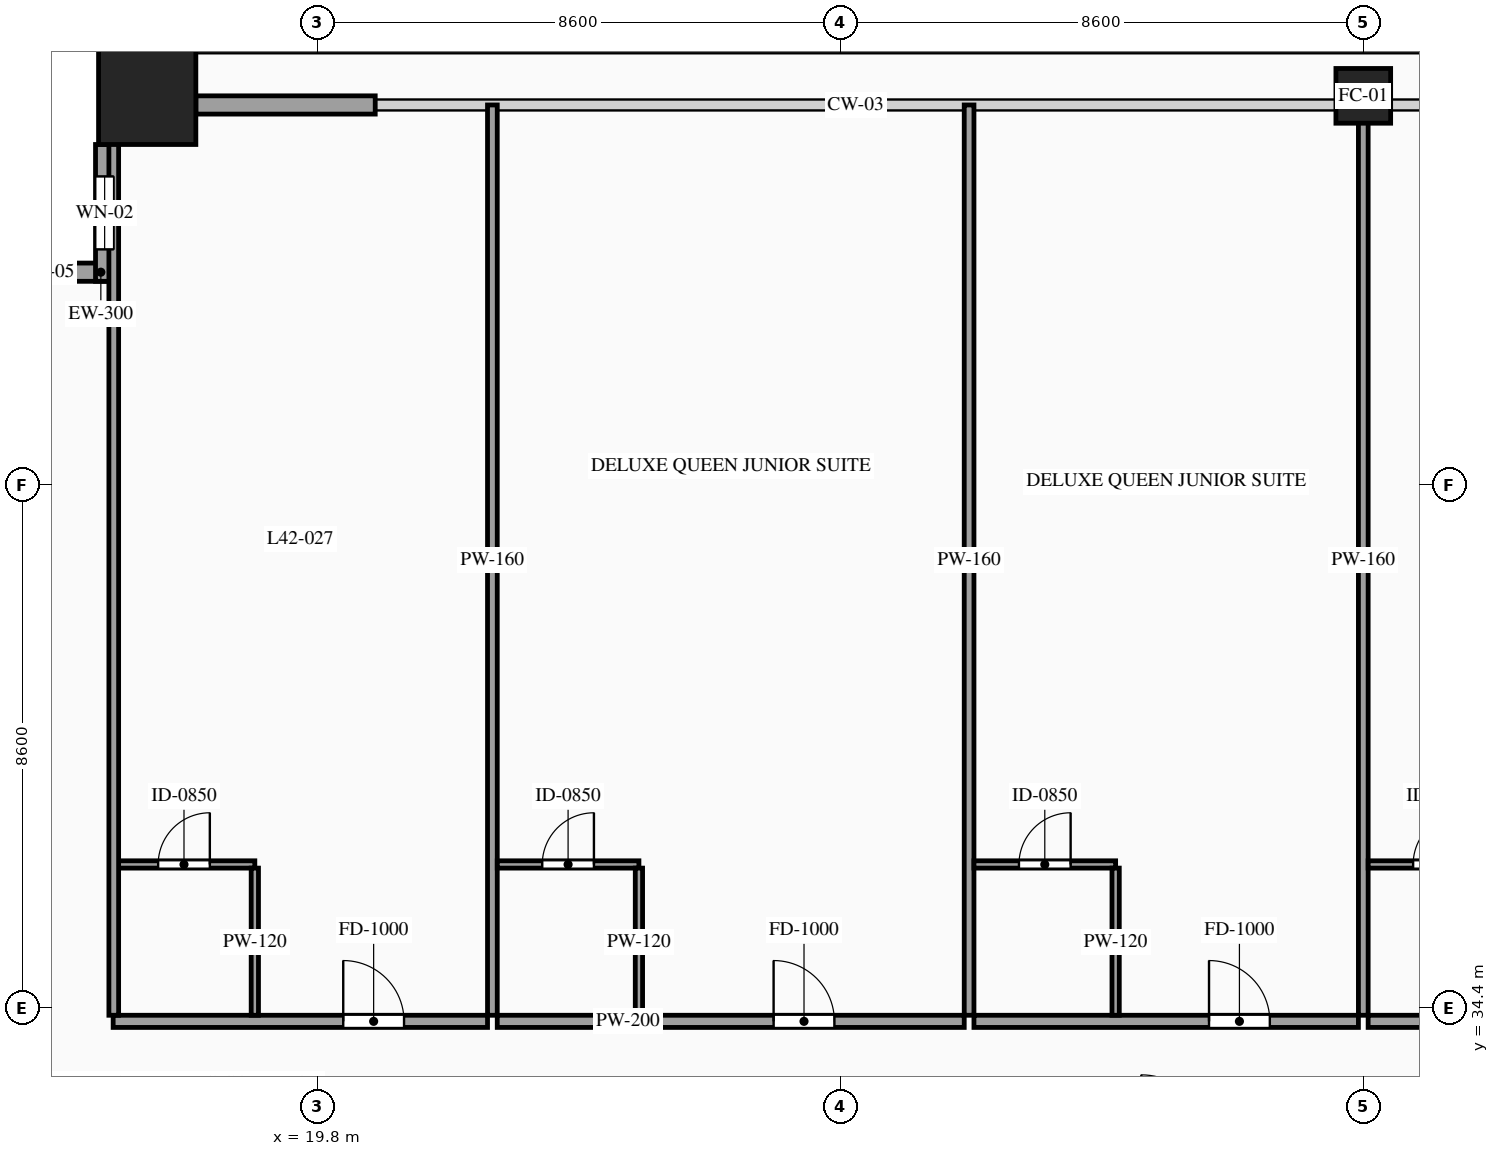
"""IFC4 building model, lengths in metres.
Left out: names, types, materials, properties, quantities, classifications, styles, units other than length and angle.
Written with IfcOpenShell. Run it as: python <this file> out.ifc"""

import sys

from ifc_helpers import new_model, si_unit, direction, frame, frame_2d, origin, origin_2d, place, context, subcontext, project, spatial, rectangle, hollow_rectangle, extrude, source, transform, mapped, element, fill, save


model = new_model("IFC4")
c1 = context("Model", 3, precision=1e-05, world=origin(), true_north=direction((0.0, 1.0)))
c2 = subcontext(c1, "Body", "Model", "MODEL_VIEW")
j1 = project(units=[si_unit("LENGTHUNIT", "METRE"), si_unit("PLANEANGLEUNIT", "RADIAN")], contexts=[c1])
p1 = place(None, origin())
s1 = spatial("IfcSite", under=j1, at=p1, CompositionType="ELEMENT")
p2 = place(p1, origin())
s2 = spatial("IfcBuilding", under=s1, at=p2, CompositionType="ELEMENT")
p3 = place(p2, frame((0.0, 0.0, 159.6)))
s3 = spatial("IfcBuildingStorey", under=s2, at=p3, CompositionType="ELEMENT", Elevation=159.6)
m1 = source(origin(), c2, "Body", "SweptSolid", [
    extrude(hollow_rectangle(XDim=1.6, YDim=1.6, WallThickness=0.07, at=origin_2d()), origin(), (0.0, 0.0, 1.0), 3.6),
])
p4 = place(p3, frame((17.0, 49.4, 0.0), z_axis=(0.0, 0.0, 1.0), x_axis=(1.0, 0.0, 0.0)))
e1 = element("IfcColumn", 1, at=p4, inside=s3, PredefinedType="COLUMN", context=c2, shape_type="MappedRepresentation", body=[
    mapped(m1, transform((0.0, 0.0, 0.0), scale=1.0)),
])
m2 = source(origin(), c2, "Body", "SweptSolid", [
    extrude(hollow_rectangle(XDim=0.9, YDim=0.9, WallThickness=0.042, at=origin_2d()), origin(), (0.0, 0.0, 1.0), 3.6),
])
p5 = place(p3, frame((37.0, 49.4, 0.0), z_axis=(0.0, 0.0, 1.0), x_axis=(1.0, 0.0, 0.0)))
e2 = element("IfcColumn", 2, at=p5, inside=s3, PredefinedType="COLUMN", context=c2, shape_type="MappedRepresentation", body=[
    mapped(m2, transform((0.0, 0.0, 0.0), scale=1.0)),
])
p6 = place(p3, frame((16.45, 46.5, 0.0), z_axis=(0.0, 0.0, 1.0), x_axis=(-1.0, 0.0, 0.0)))
e3 = element("IfcWall", 3, at=p6, inside=s3, PredefinedType="SOLIDWALL", context=c2, shape_type="SweptSolid", body=[
    extrude(rectangle(XDim=2.25, YDim=0.3, at=frame_2d((1.125, 0.0))), origin(), (0.0, 0.0, 1.0), 3.38),
])
p7 = place(p6, frame((0.675, 0.0, 0.85)))
e4 = element("IfcOpeningElement", 4, at=p7, cuts=e3, PredefinedType="OPENING", context=c2, shape_type="SweptSolid", body=[
    extrude(rectangle(XDim=0.9, YDim=1.5, at=frame_2d((0.45, 0.75))), frame((0.0, 0.165, 0.0), z_axis=(0.0, -1.0, 0.0), x_axis=(1.0, 0.0, 0.0)), (0.0, 0.0, 1.0), 0.33),
])
p8 = place(p3, frame((16.3, 48.6, 0.0), z_axis=(0.0, 0.0, 1.0), x_axis=(0.0, -1.0, 0.0)))
e5 = element("IfcWall", 5, at=p8, inside=s3, PredefinedType="SOLIDWALL", context=c2, shape_type="SweptSolid", body=[
    extrude(rectangle(XDim=2.25, YDim=0.3, at=frame_2d((1.125, 0.0))), origin(), (0.0, 0.0, 1.0), 3.38),
])
p9 = place(p8, frame((0.525, 0.0, 0.85)))
e6 = element("IfcOpeningElement", 6, at=p9, cuts=e5, PredefinedType="OPENING", context=c2, shape_type="SweptSolid", body=[
    extrude(rectangle(XDim=1.2, YDim=2.1, at=frame_2d((0.6, 1.05))), frame((0.0, 0.165, 0.0), z_axis=(0.0, -1.0, 0.0), x_axis=(1.0, 0.0, 0.0)), (0.0, 0.0, 1.0), 0.33),
])
m3 = source(origin(), c2, "Body", "SweptSolid", [
    extrude(rectangle(XDim=2.95, YDim=0.3, at=frame_2d((1.475, 0.0))), origin(), (0.0, 0.0, 1.0), 2.775),
])
p10 = place(p3, frame((17.8, 49.25, 0.0), z_axis=(0.0, 0.0, 1.0), x_axis=(1.0, 0.0, 0.0)))
e7 = element("IfcWall", 7, at=p10, inside=s3, PredefinedType="SOLIDWALL", context=c2, shape_type="MappedRepresentation", body=[
    mapped(m3, transform((0.0, 0.0, 0.0), scale=1.0)),
])
p11 = place(p3, frame((16.44, 34.18, 0.0), z_axis=(0.0, 0.0, 1.0), x_axis=(1.0, 0.0, 0.0)))
e8 = element("IfcWall", 8, at=p11, inside=s3, PredefinedType="PARTITIONING", context=c2, shape_type="SweptSolid", body=[
    extrude(rectangle(XDim=6.157, YDim=0.2, at=frame_2d((3.079, 0.0))), origin(), (0.0, 0.0, 1.0), 3.38),
])
p12 = place(p11, frame((3.784, 0.0, 0.0)))
e9 = element("IfcOpeningElement", 9, at=p12, cuts=e8, PredefinedType="OPENING", context=c2, shape_type="SweptSolid", body=[
    extrude(rectangle(XDim=1.0, YDim=2.2, at=frame_2d((0.5, 1.1))), frame((0.0, 0.115, 0.0), z_axis=(0.0, -1.0, 0.0), x_axis=(1.0, 0.0, 0.0)), (0.0, 0.0, 1.0), 0.23),
])
m4 = source(origin(), c2, "Body", "SweptSolid", [
    extrude(rectangle(XDim=14.97, YDim=0.16, at=frame_2d((7.485, 0.0))), origin(), (0.0, 0.0, 1.0), 3.38),
])
p13 = place(p3, frame((22.677, 34.28, 0.0), z_axis=(0.0, 0.0, 1.0), x_axis=(0.0, 1.0, 0.0)))
e10 = element("IfcWall", 10, at=p13, inside=s3, PredefinedType="PARTITIONING", context=c2, shape_type="MappedRepresentation", body=[
    mapped(m4, transform((0.0, 0.0, 0.0), scale=1.0)),
])
p14 = place(p3, frame((16.44, 36.76, 0.0), z_axis=(0.0, 0.0, 1.0), x_axis=(1.0, 0.0, 0.0)))
e11 = element("IfcWall", 11, at=p14, inside=s3, PredefinedType="PARTITIONING", context=c2, shape_type="SweptSolid", body=[
    extrude(rectangle(XDim=2.33, YDim=0.12, at=frame_2d((1.165, 0.0))), origin(), (0.0, 0.0, 1.0), 3.38),
])
p15 = place(p14, frame((0.74, 0.0, 0.0)))
e12 = element("IfcOpeningElement", 12, at=p15, cuts=e11, PredefinedType="OPENING", context=c2, shape_type="SweptSolid", body=[
    extrude(rectangle(XDim=0.85, YDim=2.1, at=frame_2d((0.425, 1.05))), frame((0.0, 0.075, 0.0), z_axis=(0.0, -1.0, 0.0), x_axis=(1.0, 0.0, 0.0)), (0.0, 0.0, 1.0), 0.15),
])
m5 = source(origin(), c2, "Body", "SweptSolid", [
    extrude(rectangle(XDim=2.42, YDim=0.12, at=frame_2d((1.21, 0.0))), origin(), (0.0, 0.0, 1.0), 3.38),
])
p16 = place(p3, frame((18.77, 34.28, 0.0), z_axis=(0.0, 0.0, 1.0), x_axis=(0.0, 1.0, 0.0)))
e13 = element("IfcWall", 13, at=p16, inside=s3, PredefinedType="PARTITIONING", context=c2, shape_type="MappedRepresentation", body=[
    mapped(m5, transform((0.0, 0.0, 0.0), scale=1.0)),
])
p17 = place(p3, frame((22.757, 34.18, 0.0), z_axis=(0.0, 0.0, 1.0), x_axis=(1.0, 0.0, 0.0)))
e14 = element("IfcWall", 14, at=p17, inside=s3, PredefinedType="PARTITIONING", context=c2, shape_type="SweptSolid", body=[
    extrude(rectangle(XDim=7.68, YDim=0.2, at=frame_2d((3.84, 0.0))), origin(), (0.0, 0.0, 1.0), 3.38),
])
p18 = place(p17, frame((4.545, 0.0, 0.0)))
e15 = element("IfcOpeningElement", 15, at=p18, cuts=e14, PredefinedType="OPENING", context=c2, shape_type="SweptSolid", body=[
    extrude(rectangle(XDim=1.0, YDim=2.2, at=frame_2d((0.5, 1.1))), frame((0.0, 0.115, 0.0), z_axis=(0.0, -1.0, 0.0), x_axis=(1.0, 0.0, 0.0)), (0.0, 0.0, 1.0), 0.23),
])
p19 = place(p3, frame((30.517, 34.28, 0.0), z_axis=(0.0, 0.0, 1.0), x_axis=(0.0, 1.0, 0.0)))
e16 = element("IfcWall", 16, at=p19, inside=s3, PredefinedType="PARTITIONING", context=c2, shape_type="MappedRepresentation", body=[
    mapped(m4, transform((0.0, 0.0, 0.0), scale=1.0)),
])
p20 = place(p3, frame((22.757, 36.76, 0.0), z_axis=(0.0, 0.0, 1.0), x_axis=(1.0, 0.0, 0.0)))
e17 = element("IfcWall", 17, at=p20, inside=s3, PredefinedType="PARTITIONING", context=c2, shape_type="SweptSolid", body=[
    extrude(rectangle(XDim=2.33, YDim=0.12, at=frame_2d((1.165, 0.0))), origin(), (0.0, 0.0, 1.0), 3.38),
])
p21 = place(p20, frame((0.74, 0.0, 0.0)))
e18 = element("IfcOpeningElement", 18, at=p21, cuts=e17, PredefinedType="OPENING", context=c2, shape_type="SweptSolid", body=[
    extrude(rectangle(XDim=0.85, YDim=2.1, at=frame_2d((0.425, 1.05))), frame((0.0, 0.075, 0.0), z_axis=(0.0, -1.0, 0.0), x_axis=(1.0, 0.0, 0.0)), (0.0, 0.0, 1.0), 0.15),
])
p22 = place(p3, frame((25.087, 34.28, 0.0), z_axis=(0.0, 0.0, 1.0), x_axis=(0.0, 1.0, 0.0)))
e19 = element("IfcWall", 19, at=p22, inside=s3, PredefinedType="PARTITIONING", context=c2, shape_type="MappedRepresentation", body=[
    mapped(m5, transform((0.0, 0.0, 0.0), scale=1.0)),
])
p23 = place(p3, frame((30.597, 34.18, 0.0), z_axis=(0.0, 0.0, 1.0), x_axis=(1.0, 0.0, 0.0)))
e20 = element("IfcWall", 20, at=p23, inside=s3, PredefinedType="PARTITIONING", context=c2, shape_type="SweptSolid", body=[
    extrude(rectangle(XDim=6.323, YDim=0.2, at=frame_2d((3.162, 0.0))), origin(), (0.0, 0.0, 1.0), 3.38),
])
p24 = place(p23, frame((3.866, 0.0, 0.0)))
e21 = element("IfcOpeningElement", 21, at=p24, cuts=e20, PredefinedType="OPENING", context=c2, shape_type="SweptSolid", body=[
    extrude(rectangle(XDim=1.0, YDim=2.2, at=frame_2d((0.5, 1.1))), frame((0.0, 0.115, 0.0), z_axis=(0.0, -1.0, 0.0), x_axis=(1.0, 0.0, 0.0)), (0.0, 0.0, 1.0), 0.23),
])
m6 = source(origin(), c2, "Body", "SweptSolid", [
    extrude(rectangle(XDim=14.97, YDim=0.16, at=frame_2d((7.485, 0.0))), origin(), (0.0, 0.0, 1.0), 2.675),
])
p25 = place(p3, frame((37.0, 34.28, 0.0), z_axis=(0.0, 0.0, 1.0), x_axis=(0.0, 1.0, 0.0)))
e22 = element("IfcWall", 22, at=p25, inside=s3, PredefinedType="PARTITIONING", context=c2, shape_type="MappedRepresentation", body=[
    mapped(m6, transform((0.0, 0.0, 0.0), scale=1.0)),
])
p26 = place(p3, frame((30.597, 36.76, 0.0), z_axis=(0.0, 0.0, 1.0), x_axis=(1.0, 0.0, 0.0)))
e23 = element("IfcWall", 23, at=p26, inside=s3, PredefinedType="PARTITIONING", context=c2, shape_type="SweptSolid", body=[
    extrude(rectangle(XDim=2.33, YDim=0.12, at=frame_2d((1.165, 0.0))), origin(), (0.0, 0.0, 1.0), 3.38),
])
p27 = place(p26, frame((0.74, 0.0, 0.0)))
e24 = element("IfcOpeningElement", 24, at=p27, cuts=e23, PredefinedType="OPENING", context=c2, shape_type="SweptSolid", body=[
    extrude(rectangle(XDim=0.85, YDim=2.1, at=frame_2d((0.425, 1.05))), frame((0.0, 0.075, 0.0), z_axis=(0.0, -1.0, 0.0), x_axis=(1.0, 0.0, 0.0)), (0.0, 0.0, 1.0), 0.15),
])
p28 = place(p3, frame((32.927, 34.28, 0.0), z_axis=(0.0, 0.0, 1.0), x_axis=(0.0, 1.0, 0.0)))
e25 = element("IfcWall", 25, at=p28, inside=s3, PredefinedType="PARTITIONING", context=c2, shape_type="MappedRepresentation", body=[
    mapped(m5, transform((0.0, 0.0, 0.0), scale=1.0)),
])
p29 = place(p3, frame((37.08, 34.18, 0.0), z_axis=(0.0, 0.0, 1.0), x_axis=(1.0, 0.0, 0.0)))
e26 = element("IfcWall", 26, at=p29, inside=s3, PredefinedType="PARTITIONING", context=c2, shape_type="SweptSolid", body=[
    extrude(rectangle(XDim=7.063, YDim=0.2, at=frame_2d((3.531, 0.0))), origin(), (0.0, 0.0, 1.0), 3.38),
])
p30 = place(p29, frame((4.236, 0.0, 0.0)))
e27 = element("IfcOpeningElement", 27, at=p30, cuts=e26, PredefinedType="OPENING", context=c2, shape_type="SweptSolid", body=[
    extrude(rectangle(XDim=1.0, YDim=2.2, at=frame_2d((0.5, 1.1))), frame((0.0, 0.115, 0.0), z_axis=(0.0, -1.0, 0.0), x_axis=(1.0, 0.0, 0.0)), (0.0, 0.0, 1.0), 0.23),
])
p31 = place(p3, frame((37.08, 36.76, 0.0), z_axis=(0.0, 0.0, 1.0), x_axis=(1.0, 0.0, 0.0)))
e28 = element("IfcWall", 28, at=p31, inside=s3, PredefinedType="PARTITIONING", context=c2, shape_type="SweptSolid", body=[
    extrude(rectangle(XDim=2.33, YDim=0.12, at=frame_2d((1.165, 0.0))), origin(), (0.0, 0.0, 1.0), 3.38),
])
p32 = place(p31, frame((0.74, 0.0, 0.0)))
e29 = element("IfcOpeningElement", 29, at=p32, cuts=e28, PredefinedType="OPENING", context=c2, shape_type="SweptSolid", body=[
    extrude(rectangle(XDim=0.85, YDim=2.1, at=frame_2d((0.425, 1.05))), frame((0.0, 0.075, 0.0), z_axis=(0.0, -1.0, 0.0), x_axis=(1.0, 0.0, 0.0)), (0.0, 0.0, 1.0), 0.15),
])
m7 = source(origin(), c2, "Body", "SweptSolid", [
    extrude(rectangle(XDim=14.82, YDim=0.16, at=frame_2d((7.41, 0.0))), origin(), (0.0, 0.0, 1.0), 3.38),
])
p33 = place(p3, frame((16.45, 34.28, 0.0), z_axis=(0.0, 0.0, 1.0), x_axis=(0.0, 1.0, 0.0)))
e30 = element("IfcWall", 30, at=p33, inside=s3, PredefinedType="PARTITIONING", context=c2, shape_type="MappedRepresentation", body=[
    mapped(m7, transform((0.0, 0.0, 0.0), scale=1.0)),
])
m8 = source(origin(), c2, "Body", "SweptSolid", [
    extrude(rectangle(XDim=0.9, YDim=1.5, at=frame_2d((0.45, 0.75))), frame((0.0, 0.03, 0.0), z_axis=(0.0, -1.0, 0.0), x_axis=(1.0, 0.0, 0.0)), (0.0, 0.0, 1.0), 0.06),
])
p34 = place(p7, origin())
e31 = element("IfcWindow", 31, at=p34, inside=s3, PartitioningType="SINGLE_PANEL", PredefinedType="WINDOW", context=c2, shape_type="MappedRepresentation", body=[
    mapped(m8, transform((0.0, 0.0, 0.0), scale=1.0)),
])
fill(e4, e31)
m9 = source(origin(), c2, "Body", "SweptSolid", [
    extrude(rectangle(XDim=1.2, YDim=2.1, at=frame_2d((0.6, 1.05))), frame((0.0, 0.03, 0.0), z_axis=(0.0, -1.0, 0.0), x_axis=(1.0, 0.0, 0.0)), (0.0, 0.0, 1.0), 0.06),
])
p35 = place(p9, origin())
e32 = element("IfcWindow", 32, at=p35, inside=s3, PartitioningType="SINGLE_PANEL", PredefinedType="WINDOW", context=c2, shape_type="MappedRepresentation", body=[
    mapped(m9, transform((0.0, 0.0, 0.0), scale=1.0)),
])
fill(e6, e32)
m10 = source(origin(), c2, "Body", "SweptSolid", [
    extrude(rectangle(XDim=1.0, YDim=2.2, at=frame_2d((0.5, 1.1))), frame((0.0, 0.025, 0.0), z_axis=(0.0, -1.0, 0.0), x_axis=(1.0, 0.0, 0.0)), (0.0, 0.0, 1.0), 0.05),
])
p36 = place(p12, origin())
e33 = element("IfcDoor", 33, at=p36, inside=s3, OperationType="SINGLE_SWING_LEFT", PredefinedType="DOOR", context=c2, shape_type="MappedRepresentation", body=[
    mapped(m10, transform((0.0, 0.0, 0.0), scale=1.0)),
])
fill(e9, e33)
m11 = source(origin(), c2, "Body", "SweptSolid", [
    extrude(rectangle(XDim=0.85, YDim=2.1, at=frame_2d((0.425, 1.05))), frame((0.0, 0.025, 0.0), z_axis=(0.0, -1.0, 0.0), x_axis=(1.0, 0.0, 0.0)), (0.0, 0.0, 1.0), 0.05),
])
p37 = place(p15, origin())
e34 = element("IfcDoor", 34, at=p37, inside=s3, OperationType="SINGLE_SWING_RIGHT", PredefinedType="DOOR", context=c2, shape_type="MappedRepresentation", body=[
    mapped(m11, transform((0.0, 0.0, 0.0), scale=1.0)),
])
fill(e12, e34)
p38 = place(p18, origin())
e35 = element("IfcDoor", 35, at=p38, inside=s3, OperationType="SINGLE_SWING_LEFT", PredefinedType="DOOR", context=c2, shape_type="MappedRepresentation", body=[
    mapped(m10, transform((0.0, 0.0, 0.0), scale=1.0)),
])
fill(e15, e35)
p39 = place(p21, origin())
e36 = element("IfcDoor", 36, at=p39, inside=s3, OperationType="SINGLE_SWING_RIGHT", PredefinedType="DOOR", context=c2, shape_type="MappedRepresentation", body=[
    mapped(m11, transform((0.0, 0.0, 0.0), scale=1.0)),
])
fill(e18, e36)
p40 = place(p24, origin())
e37 = element("IfcDoor", 37, at=p40, inside=s3, OperationType="SINGLE_SWING_LEFT", PredefinedType="DOOR", context=c2, shape_type="MappedRepresentation", body=[
    mapped(m10, transform((0.0, 0.0, 0.0), scale=1.0)),
])
fill(e21, e37)
p41 = place(p27, origin())
e38 = element("IfcDoor", 38, at=p41, inside=s3, OperationType="SINGLE_SWING_RIGHT", PredefinedType="DOOR", context=c2, shape_type="MappedRepresentation", body=[
    mapped(m11, transform((0.0, 0.0, 0.0), scale=1.0)),
])
fill(e24, e38)
p42 = place(p32, origin())
e39 = element("IfcDoor", 39, at=p42, inside=s3, OperationType="SINGLE_SWING_RIGHT", PredefinedType="DOOR", context=c2, shape_type="MappedRepresentation", body=[
    mapped(m11, transform((0.0, 0.0, 0.0), scale=1.0)),
])
fill(e29, e39)
save(model, sys.argv[1])
